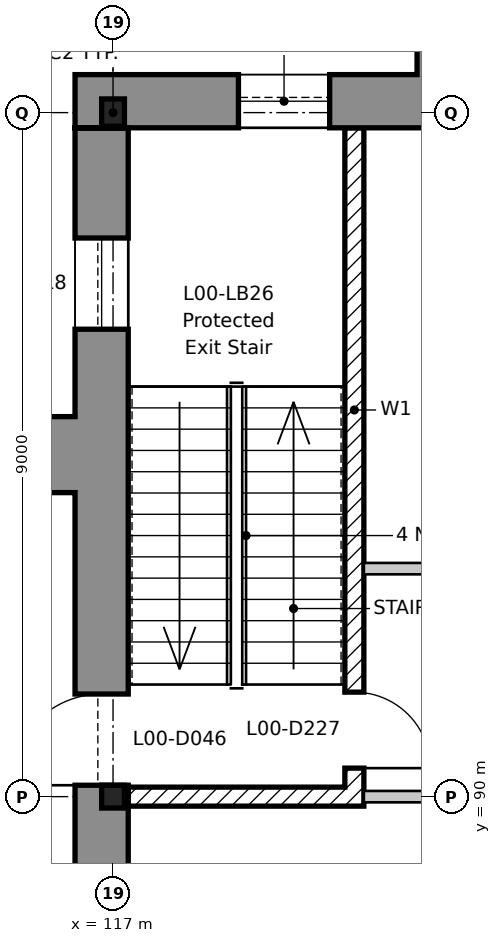
"""IFC4 building model, lengths in metres.
Left out: names, types, materials, properties, quantities, classifications, styles, units other than length and angle.
Written with IfcOpenShell. Run it as: python <this file> out.ifc"""

import sys

from ifc_helpers import new_model, si_unit, direction, frame, frame_2d, origin, origin_2d, place, context, subcontext, project, spatial, rectangle, i_section, extrude, element, fill, save


model = new_model("IFC4")
c1 = context("Model", 3, precision=1e-05, world=origin(), true_north=direction((0.0, 1.0)))
c2 = subcontext(c1, "Body", "Model", "MODEL_VIEW")
j1 = project(units=[si_unit("LENGTHUNIT", "METRE"), si_unit("PLANEANGLEUNIT", "RADIAN")], contexts=[c1])
p1 = place(None, origin())
s1 = spatial("IfcSite", under=j1, at=p1, CompositionType="ELEMENT")
p2 = place(p1, origin())
s2 = spatial("IfcBuilding", under=s1, at=p2, CompositionType="ELEMENT")
p3 = place(p2, origin())
s3 = spatial("IfcBuildingStorey", under=s2, at=p3, CompositionType="ELEMENT", Elevation=0.0)
p4 = place(p3, frame((117.0, 90.0, -0.6), z_axis=(0.0, 0.0, 1.0), x_axis=(1.0, 0.0, 0.0)))
e1 = element("IfcColumn", 1, at=p4, inside=s3, PredefinedType="COLUMN", context=c2, shape_type="SweptSolid", body=[
    extrude(i_section(OverallWidth=0.3, OverallDepth=0.3, WebThickness=0.011, FlangeThickness=0.019, FilletRadius=0.027, at=origin_2d()), origin(), (0.0, 0.0, 1.0), 5.8),
])
p5 = place(p3, frame((117.0, 99.0, -0.6), z_axis=(0.0, 0.0, 1.0), x_axis=(1.0, 0.0, 0.0)))
e2 = element("IfcColumn", 2, at=p5, inside=s3, PredefinedType="COLUMN", context=c2, shape_type="SweptSolid", body=[
    extrude(i_section(OverallWidth=0.3, OverallDepth=0.36, WebThickness=0.012, FlangeThickness=0.022, FilletRadius=0.027, at=origin_2d()), origin(), (0.0, 0.0, 1.0), 5.8),
])
p6 = place(p3, frame((120.175, 90.125, 0.0), z_axis=(0.0, 0.0, 1.0), x_axis=(0.0, 1.0, 0.0)))
e3 = element("IfcWall", 3, at=p6, inside=s3, PredefinedType="SHEAR", context=c2, shape_type="SweptSolid", body=[
    extrude(rectangle(XDim=8.675, YDim=0.25, at=frame_2d((4.337, 0.0))), origin(), (0.0, 0.0, 1.0), 5.2),
])
p7 = place(p6, frame((0.25, 0.0, 0.0)))
e4 = element("IfcOpeningElement", 4, at=p7, cuts=e3, PredefinedType="OPENING", context=c2, shape_type="SweptSolid", body=[
    extrude(rectangle(XDim=1.0, YDim=2.1, at=frame_2d((0.5, 1.05))), frame((0.0, 0.135, 0.0), z_axis=(0.0, -1.0, 0.0), x_axis=(1.0, 0.0, 0.0)), (0.0, 0.0, 1.0), 0.27),
])
p8 = place(p3, frame((117.2, 90.0, 0.0), z_axis=(0.0, 0.0, 1.0), x_axis=(1.0, 0.0, 0.0)))
e5 = element("IfcWall", 5, at=p8, inside=s3, PredefinedType="SHEAR", context=c2, shape_type="SweptSolid", body=[
    extrude(rectangle(XDim=3.1, YDim=0.25, at=frame_2d((1.55, 0.0))), origin(), (0.0, 0.0, 1.0), 4.7),
])
p9 = place(p3, frame((116.5, 99.15, 0.0), z_axis=(0.0, 0.0, 1.0), x_axis=(1.0, 0.0, 0.0)))
e6 = element("IfcWall", 6, at=p9, inside=s3, PredefinedType="STANDARD", context=c2, shape_type="SweptSolid", body=[
    extrude(rectangle(XDim=55.0, YDim=0.7, at=frame_2d((27.5, 0.0))), origin(), (0.0, 0.0, 1.0), 5.2),
])
p10 = place(p9, frame((2.15, 0.0, 1.2)))
e7 = element("IfcOpeningElement", 7, at=p10, cuts=e6, PredefinedType="OPENING", context=c2, shape_type="SweptSolid", body=[
    extrude(rectangle(XDim=1.2, YDim=1.8, at=frame_2d((0.6, 0.9))), frame((0.0, 0.36, 0.0), z_axis=(0.0, -1.0, 0.0), x_axis=(1.0, 0.0, 0.0)), (0.0, 0.0, 1.0), 0.72),
])
p11 = place(p9, frame((6.65, 0.0, 1.2)))
e8 = element("IfcOpeningElement", 8, at=p11, cuts=e6, PredefinedType="OPENING", context=c2, shape_type="SweptSolid", body=[
    extrude(rectangle(XDim=1.2, YDim=1.8, at=frame_2d((0.6, 0.9))), frame((0.0, 0.36, 0.0), z_axis=(0.0, -1.0, 0.0), x_axis=(1.0, 0.0, 0.0)), (0.0, 0.0, 1.0), 0.72),
])
p12 = place(p9, frame((11.15, 0.0, 1.2)))
e9 = element("IfcOpeningElement", 9, at=p12, cuts=e6, PredefinedType="OPENING", context=c2, shape_type="SweptSolid", body=[
    extrude(rectangle(XDim=1.2, YDim=1.8, at=frame_2d((0.6, 0.9))), frame((0.0, 0.36, 0.0), z_axis=(0.0, -1.0, 0.0), x_axis=(1.0, 0.0, 0.0)), (0.0, 0.0, 1.0), 0.72),
])
p13 = place(p9, frame((15.65, 0.0, 1.2)))
e10 = element("IfcOpeningElement", 10, at=p13, cuts=e6, PredefinedType="OPENING", context=c2, shape_type="SweptSolid", body=[
    extrude(rectangle(XDim=1.2, YDim=1.8, at=frame_2d((0.6, 0.9))), frame((0.0, 0.36, 0.0), z_axis=(0.0, -1.0, 0.0), x_axis=(1.0, 0.0, 0.0)), (0.0, 0.0, 1.0), 0.72),
])
p14 = place(p9, frame((20.15, 0.0, 1.2)))
e11 = element("IfcOpeningElement", 11, at=p14, cuts=e6, PredefinedType="OPENING", context=c2, shape_type="SweptSolid", body=[
    extrude(rectangle(XDim=1.2, YDim=1.8, at=frame_2d((0.6, 0.9))), frame((0.0, 0.36, 0.0), z_axis=(0.0, -1.0, 0.0), x_axis=(1.0, 0.0, 0.0)), (0.0, 0.0, 1.0), 0.72),
])
p15 = place(p9, frame((24.65, 0.0, 1.2)))
e12 = element("IfcOpeningElement", 12, at=p15, cuts=e6, PredefinedType="OPENING", context=c2, shape_type="SweptSolid", body=[
    extrude(rectangle(XDim=1.2, YDim=1.8, at=frame_2d((0.6, 0.9))), frame((0.0, 0.36, 0.0), z_axis=(0.0, -1.0, 0.0), x_axis=(1.0, 0.0, 0.0)), (0.0, 0.0, 1.0), 0.72),
])
p16 = place(p9, frame((29.15, 0.0, 1.2)))
e13 = element("IfcOpeningElement", 13, at=p16, cuts=e6, PredefinedType="OPENING", context=c2, shape_type="SweptSolid", body=[
    extrude(rectangle(XDim=1.2, YDim=1.8, at=frame_2d((0.6, 0.9))), frame((0.0, 0.36, 0.0), z_axis=(0.0, -1.0, 0.0), x_axis=(1.0, 0.0, 0.0)), (0.0, 0.0, 1.0), 0.72),
])
p17 = place(p9, frame((33.65, 0.0, 1.2)))
e14 = element("IfcOpeningElement", 14, at=p17, cuts=e6, PredefinedType="OPENING", context=c2, shape_type="SweptSolid", body=[
    extrude(rectangle(XDim=1.2, YDim=1.8, at=frame_2d((0.6, 0.9))), frame((0.0, 0.36, 0.0), z_axis=(0.0, -1.0, 0.0), x_axis=(1.0, 0.0, 0.0)), (0.0, 0.0, 1.0), 0.72),
])
p18 = place(p9, frame((38.15, 0.0, 1.2)))
e15 = element("IfcOpeningElement", 15, at=p18, cuts=e6, PredefinedType="OPENING", context=c2, shape_type="SweptSolid", body=[
    extrude(rectangle(XDim=1.2, YDim=1.8, at=frame_2d((0.6, 0.9))), frame((0.0, 0.36, 0.0), z_axis=(0.0, -1.0, 0.0), x_axis=(1.0, 0.0, 0.0)), (0.0, 0.0, 1.0), 0.72),
])
p19 = place(p9, frame((42.65, 0.0, 1.2)))
e16 = element("IfcOpeningElement", 16, at=p19, cuts=e6, PredefinedType="OPENING", context=c2, shape_type="SweptSolid", body=[
    extrude(rectangle(XDim=1.2, YDim=1.8, at=frame_2d((0.6, 0.9))), frame((0.0, 0.36, 0.0), z_axis=(0.0, -1.0, 0.0), x_axis=(1.0, 0.0, 0.0)), (0.0, 0.0, 1.0), 0.72),
])
p20 = place(p9, frame((49.1, 0.0, 0.0)))
e17 = element("IfcOpeningElement", 17, at=p20, cuts=e6, PredefinedType="OPENING", context=c2, shape_type="SweptSolid", body=[
    extrude(rectangle(XDim=1.8, YDim=2.1, at=frame_2d((0.9, 1.05))), frame((0.0, 0.36, 0.0), z_axis=(0.0, -1.0, 0.0), x_axis=(1.0, 0.0, 0.0)), (0.0, 0.0, 1.0), 0.72),
])
p21 = place(p3, frame((116.85, 63.2, 0.0), z_axis=(0.0, 0.0, 1.0), x_axis=(0.0, 1.0, 0.0)))
e18 = element("IfcWall", 18, at=p21, inside=s3, PredefinedType="STANDARD", context=c2, shape_type="SweptSolid", body=[
    extrude(rectangle(XDim=35.6, YDim=0.7, at=frame_2d((17.8, 0.0))), origin(), (0.0, 0.0, 1.0), 5.2),
])
p22 = place(p21, frame((10.45, 0.0, 1.2)))
e19 = element("IfcOpeningElement", 19, at=p22, cuts=e18, PredefinedType="OPENING", context=c2, shape_type="SweptSolid", body=[
    extrude(rectangle(XDim=1.2, YDim=1.8, at=frame_2d((0.6, 0.9))), frame((0.0, 0.36, 0.0), z_axis=(0.0, -1.0, 0.0), x_axis=(1.0, 0.0, 0.0)), (0.0, 0.0, 1.0), 0.72),
])
p23 = place(p21, frame((14.95, 0.0, 1.2)))
e20 = element("IfcOpeningElement", 20, at=p23, cuts=e18, PredefinedType="OPENING", context=c2, shape_type="SweptSolid", body=[
    extrude(rectangle(XDim=1.2, YDim=1.8, at=frame_2d((0.6, 0.9))), frame((0.0, 0.36, 0.0), z_axis=(0.0, -1.0, 0.0), x_axis=(1.0, 0.0, 0.0)), (0.0, 0.0, 1.0), 0.72),
])
p24 = place(p21, frame((19.45, 0.0, 1.2)))
e21 = element("IfcOpeningElement", 21, at=p24, cuts=e18, PredefinedType="OPENING", context=c2, shape_type="SweptSolid", body=[
    extrude(rectangle(XDim=1.2, YDim=1.8, at=frame_2d((0.6, 0.9))), frame((0.0, 0.36, 0.0), z_axis=(0.0, -1.0, 0.0), x_axis=(1.0, 0.0, 0.0)), (0.0, 0.0, 1.0), 0.72),
])
p25 = place(p21, frame((23.95, 0.0, 1.2)))
e22 = element("IfcOpeningElement", 22, at=p25, cuts=e18, PredefinedType="OPENING", context=c2, shape_type="SweptSolid", body=[
    extrude(rectangle(XDim=1.2, YDim=1.8, at=frame_2d((0.6, 0.9))), frame((0.0, 0.36, 0.0), z_axis=(0.0, -1.0, 0.0), x_axis=(1.0, 0.0, 0.0)), (0.0, 0.0, 1.0), 0.72),
])
p26 = place(p21, frame((32.95, 0.0, 1.2)))
e23 = element("IfcOpeningElement", 23, at=p26, cuts=e18, PredefinedType="OPENING", context=c2, shape_type="SweptSolid", body=[
    extrude(rectangle(XDim=1.2, YDim=1.8, at=frame_2d((0.6, 0.9))), frame((0.0, 0.36, 0.0), z_axis=(0.0, -1.0, 0.0), x_axis=(1.0, 0.0, 0.0)), (0.0, 0.0, 1.0), 0.72),
])
p27 = place(p21, frame((26.95, 0.0, 0.0)))
e24 = element("IfcOpeningElement", 24, at=p27, cuts=e18, PredefinedType="OPENING", context=c2, shape_type="SweptSolid", body=[
    extrude(rectangle(XDim=1.2, YDim=2.1, at=frame_2d((0.6, 1.05))), frame((0.0, 0.36, 0.0), z_axis=(0.0, -1.0, 0.0), x_axis=(1.0, 0.0, 0.0)), (0.0, 0.0, 1.0), 0.72),
])
for number, where, z_axis, x_axis in (
    (25, (121.0, 100.1, 0.0), (0.0, 0.0, 1.0), (1.0, 0.0, 0.0)),
    (26, (115.9, 94.0, 0.0), (0.0, 0.0, 1.0), (0.0, 1.0, 0.0)),
):
    element("IfcWall", number, at=place(p3, frame(where, z_axis=z_axis, x_axis=x_axis)), inside=s3, PredefinedType="STANDARD", context=c2, shape_type="SweptSolid", body=[
        extrude(rectangle(XDim=1.0, YDim=1.2, at=frame_2d((0.5, 0.0))), origin(), (0.0, 0.0, 1.0), 5.4),
    ])
for number, where, z_axis, x_axis in (
    (27, (120.3, 90.0, 0.0), (0.0, 0.0, 1.0), (1.0, 0.0, 0.0)),
    (28, (120.3, 93.0, 0.0), (0.0, 0.0, 1.0), (1.0, 0.0, 0.0)),
):
    element("IfcWall", number, at=place(p3, frame(where, z_axis=z_axis, x_axis=x_axis)), inside=s3, PredefinedType="PARTITIONING", context=c2, shape_type="SweptSolid", body=[
        extrude(rectangle(XDim=2.7, YDim=0.15, at=frame_2d((1.35, 0.0))), origin(), (0.0, 0.0, 1.0), 4.68),
    ])
p28 = place(p10, origin())
e29 = element("IfcWindow", 29, at=p28, inside=s3, PartitioningType="SINGLE_PANEL", PredefinedType="WINDOW", context=c2, shape_type="SweptSolid", body=[
    extrude(rectangle(XDim=1.2, YDim=1.8, at=frame_2d((0.6, 0.9))), frame((0.0, 0.03, 0.0), z_axis=(0.0, -1.0, 0.0), x_axis=(1.0, 0.0, 0.0)), (0.0, 0.0, 1.0), 0.06),
])
fill(e7, e29)
p29 = place(p26, origin())
e30 = element("IfcWindow", 30, at=p29, inside=s3, PartitioningType="SINGLE_PANEL", PredefinedType="WINDOW", context=c2, shape_type="SweptSolid", body=[
    extrude(rectangle(XDim=1.2, YDim=1.8, at=frame_2d((0.6, 0.9))), frame((0.0, 0.03, 0.0), z_axis=(0.0, -1.0, 0.0), x_axis=(1.0, 0.0, 0.0)), (0.0, 0.0, 1.0), 0.06),
])
fill(e23, e30)
p30 = place(p27, origin())
e31 = element("IfcDoor", 31, at=p30, inside=s3, OperationType="SINGLE_SWING_LEFT", PredefinedType="DOOR", context=c2, shape_type="SweptSolid", body=[
    extrude(rectangle(XDim=1.2, YDim=2.1, at=frame_2d((0.6, 1.05))), frame((0.0, 0.025, 0.0), z_axis=(0.0, -1.0, 0.0), x_axis=(1.0, 0.0, 0.0)), (0.0, 0.0, 1.0), 0.05),
])
fill(e24, e31)
p31 = place(p7, frame((1.0, 0.0, 0.0), z_axis=(0.0, 0.0, 1.0), x_axis=(-1.0, 0.0, 0.0)))
e32 = element("IfcDoor", 32, at=p31, inside=s3, OperationType="SINGLE_SWING_RIGHT", PredefinedType="DOOR", context=c2, shape_type="SweptSolid", body=[
    extrude(rectangle(XDim=1.0, YDim=2.1, at=frame_2d((0.5, 1.05))), frame((0.0, 0.025, 0.0), z_axis=(0.0, -1.0, 0.0), x_axis=(1.0, 0.0, 0.0)), (0.0, 0.0, 1.0), 0.05),
])
fill(e4, e32)
save(model, sys.argv[1])
